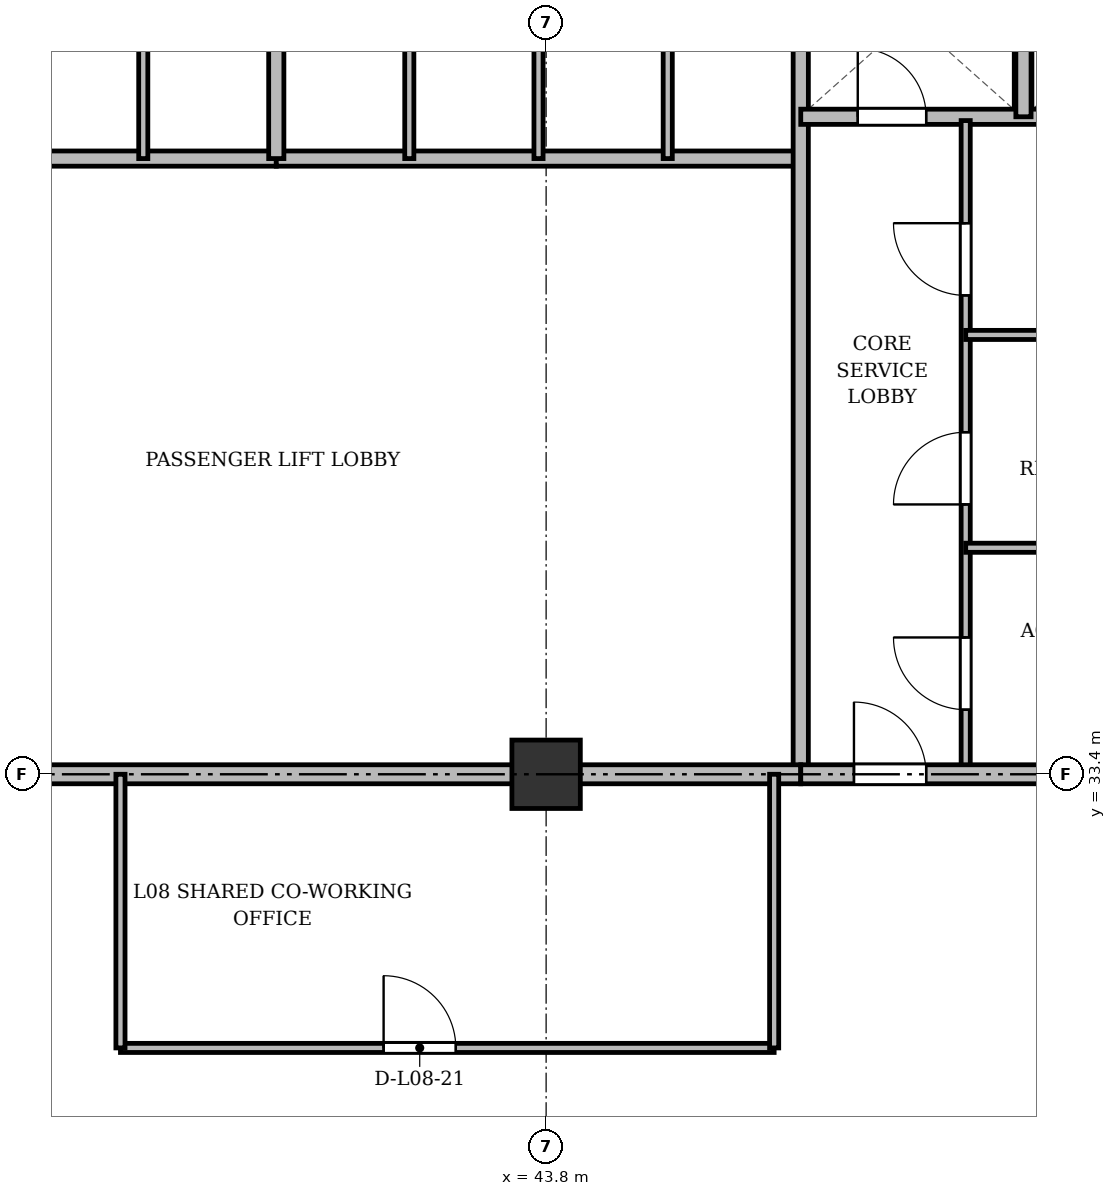
"""IFC4 building model, lengths in metres.
Left out: names, types, materials, properties, quantities, classifications, styles, units other than length and angle.
Written with IfcOpenShell. Run it as: python <this file> out.ifc"""

import sys

from ifc_helpers import new_model, si_unit, direction, frame, frame_2d, origin, origin_2d, place, context, subcontext, project, spatial, rectangle, extrude, source, transform, mapped, element, fill, save


model = new_model("IFC4")
c1 = context("Model", 3, precision=1e-05, world=origin(), true_north=direction((0.0, 1.0)))
c2 = subcontext(c1, "Body", "Model", "MODEL_VIEW")
j1 = project(units=[si_unit("LENGTHUNIT", "METRE"), si_unit("PLANEANGLEUNIT", "RADIAN")], contexts=[c1])
p1 = place(None, origin())
s1 = spatial("IfcSite", under=j1, at=p1, CompositionType="ELEMENT")
p2 = place(p1, origin())
s2 = spatial("IfcBuilding", under=s1, at=p2, CompositionType="ELEMENT")
p3 = place(p2, frame((0.0, 0.0, 34.3)))
s3 = spatial("IfcBuildingStorey", under=s2, at=p3, CompositionType="ELEMENT", Elevation=34.3)
m1 = source(origin(), c2, "Body", "SweptSolid", [
    extrude(rectangle(XDim=0.9, YDim=0.9, at=origin_2d()), origin(), (0.0, 0.0, 1.0), 3.6),
])
p4 = place(p3, frame((43.8, 33.4, 0.0), z_axis=(0.0, 0.0, 1.0), x_axis=(1.0, 0.0, 0.0)))
e1 = element("IfcColumn", 1, at=p4, inside=s3, PredefinedType="COLUMN", context=c2, shape_type="MappedRepresentation", body=[
    mapped(m1, transform((0.0, 0.0, 0.0), x_axis=(1.0, 0.0, 0.0), y_axis=(0.0, 1.0, 0.0), z_axis=(0.0, 0.0, 1.0), scale=1.0)),
])
p5 = place(p3, frame((33.35, 41.5, 0.0), z_axis=(0.0, 0.0, 1.0), x_axis=(1.0, 0.0, 0.0)))
e2 = element("IfcWall", 2, at=p5, inside=s3, PredefinedType="SOLIDWALL", context=c2, shape_type="SweptSolid", body=[
    extrude(rectangle(XDim=6.9, YDim=0.2, at=frame_2d((3.45, 0.0))), origin(), (0.0, 0.0, 1.0), 3.34),
])
p6 = place(p3, frame((38.5, 41.5, 0.0), z_axis=(0.0, 0.0, 1.0), x_axis=(0.0, 1.0, 0.0)))
e3 = element("IfcWall", 3, at=p6, inside=s3, PredefinedType="PARTITIONING", context=c2, shape_type="SweptSolid", body=[
    extrude(rectangle(XDim=3.2, YDim=0.12, at=frame_2d((1.6, 0.0))), origin(), (0.0, 0.0, 1.0), 3.34),
])
p7 = place(p3, frame((40.25, 41.5, 0.0), z_axis=(0.0, 0.0, 1.0), x_axis=(1.0, 0.0, 0.0)))
e4 = element("IfcWall", 4, at=p7, inside=s3, PredefinedType="SOLIDWALL", context=c2, shape_type="SweptSolid", body=[
    extrude(rectangle(XDim=6.9, YDim=0.2, at=frame_2d((3.45, 0.0))), origin(), (0.0, 0.0, 1.0), 2.752),
])
p8 = place(p3, frame((40.25, 41.5, 0.0), z_axis=(0.0, 0.0, 1.0), x_axis=(0.0, 1.0, 0.0)))
e5 = element("IfcWall", 5, at=p8, inside=s3, PredefinedType="SOLIDWALL", context=c2, shape_type="SweptSolid", body=[
    extrude(rectangle(XDim=3.2, YDim=0.2, at=frame_2d((1.6, 0.0))), origin(), (0.0, 0.0, 1.0), 3.34),
])
p9 = place(p3, frame((42.0, 41.5, 0.0), z_axis=(0.0, 0.0, 1.0), x_axis=(0.0, 1.0, 0.0)))
e6 = element("IfcWall", 6, at=p9, inside=s3, PredefinedType="PARTITIONING", context=c2, shape_type="SweptSolid", body=[
    extrude(rectangle(XDim=3.2, YDim=0.12, at=frame_2d((1.6, 0.0))), origin(), (0.0, 0.0, 1.0), 3.34),
])
p10 = place(p3, frame((43.7, 41.5, 0.0), z_axis=(0.0, 0.0, 1.0), x_axis=(0.0, 1.0, 0.0)))
e7 = element("IfcWall", 7, at=p10, inside=s3, PredefinedType="PARTITIONING", context=c2, shape_type="SweptSolid", body=[
    extrude(rectangle(XDim=3.2, YDim=0.12, at=frame_2d((1.6, 0.0))), origin(), (0.0, 0.0, 1.0), 2.752),
])
p11 = place(p3, frame((45.4, 41.5, 0.0), z_axis=(0.0, 0.0, 1.0), x_axis=(0.0, 1.0, 0.0)))
e8 = element("IfcWall", 8, at=p11, inside=s3, PredefinedType="PARTITIONING", context=c2, shape_type="SweptSolid", body=[
    extrude(rectangle(XDim=3.2, YDim=0.12, at=frame_2d((1.6, 0.0))), origin(), (0.0, 0.0, 1.0), 3.34),
])
p12 = place(p3, frame((47.15, 33.4, 0.0), z_axis=(0.0, 0.0, 1.0), x_axis=(0.0, 1.0, 0.0)))
e9 = element("IfcWall", 9, at=p12, inside=s3, PredefinedType="SOLIDWALL", context=c2, shape_type="SweptSolid", body=[
    extrude(rectangle(XDim=11.3, YDim=0.2, at=frame_2d((5.65, 0.0))), origin(), (0.0, 0.0, 1.0), 2.69),
])
p13 = place(p3, frame((26.3, 33.4, 0.0), z_axis=(0.0, 0.0, 1.0), x_axis=(1.0, 0.0, 0.0)))
e10 = element("IfcWall", 10, at=p13, inside=s3, PredefinedType="PARTITIONING", context=c2, shape_type="SweptSolid", body=[
    extrude(rectangle(XDim=20.85, YDim=0.25, at=frame_2d((10.425, 0.0))), origin(), (0.0, 0.0, 1.0), 2.69),
])
p14 = place(p13, frame((9.2, 0.0, 0.0)))
e11 = element("IfcOpeningElement", 11, at=p14, cuts=e10, PredefinedType="OPENING", context=c2, shape_type="SweptSolid", body=[
    extrude(rectangle(XDim=1.6, YDim=2.2, at=frame_2d((0.8, 1.1))), frame((0.0, 0.135, 0.0), z_axis=(0.0, -1.0, 0.0), x_axis=(1.0, 0.0, 0.0)), (0.0, 0.0, 1.0), 0.27),
])
p15 = place(p3, frame((47.15, 42.05, 0.0), z_axis=(0.0, 0.0, 1.0), x_axis=(1.0, 0.0, 0.0)))
e12 = element("IfcWall", 12, at=p15, inside=s3, PredefinedType="SOLIDWALL", context=c2, shape_type="SweptSolid", body=[
    extrude(rectangle(XDim=7.85, YDim=0.2, at=frame_2d((3.925, 0.0))), origin(), (0.0, 0.0, 1.0), 2.752),
])
p16 = place(p15, frame((0.75, 0.0, 0.0)))
e13 = element("IfcOpeningElement", 13, at=p16, cuts=e12, PredefinedType="OPENING", context=c2, shape_type="SweptSolid", body=[
    extrude(rectangle(XDim=0.9, YDim=2.1, at=frame_2d((0.45, 1.05))), frame((0.0, 0.11, 0.0), z_axis=(0.0, -1.0, 0.0), x_axis=(1.0, 0.0, 0.0)), (0.0, 0.0, 1.0), 0.22),
])
p17 = place(p15, frame((3.85, 0.0, 0.0)))
e14 = element("IfcOpeningElement", 14, at=p17, cuts=e12, PredefinedType="OPENING", context=c2, shape_type="SweptSolid", body=[
    extrude(rectangle(XDim=0.9, YDim=2.1, at=frame_2d((0.45, 1.05))), frame((0.0, 0.11, 0.0), z_axis=(0.0, -1.0, 0.0), x_axis=(1.0, 0.0, 0.0)), (0.0, 0.0, 1.0), 0.22),
])
p18 = place(p3, frame((50.08, 42.05, 0.0), z_axis=(0.0, 0.0, 1.0), x_axis=(0.0, 1.0, 0.0)))
e15 = element("IfcWall", 15, at=p18, inside=s3, PredefinedType="SOLIDWALL", context=c2, shape_type="SweptSolid", body=[
    extrude(rectangle(XDim=2.65, YDim=0.2, at=frame_2d((1.325, 0.0))), origin(), (0.0, 0.0, 1.0), 3.34),
])
p19 = place(p3, frame((49.32, 33.4, 0.0), z_axis=(0.0, 0.0, 1.0), x_axis=(0.0, 1.0, 0.0)))
e16 = element("IfcWall", 16, at=p19, inside=s3, PredefinedType="PARTITIONING", context=c2, shape_type="SweptSolid", body=[
    extrude(rectangle(XDim=8.6, YDim=0.12, at=frame_2d((4.3, 0.0))), origin(), (0.0, 0.0, 1.0), 2.69),
])
p20 = place(p19, frame((0.85, 0.0, 0.0)))
e17 = element("IfcOpeningElement", 17, at=p20, cuts=e16, PredefinedType="OPENING", context=c2, shape_type="SweptSolid", body=[
    extrude(rectangle(XDim=0.95, YDim=2.15, at=frame_2d((0.475, 1.075))), frame((0.0, 0.07, 0.0), z_axis=(0.0, -1.0, 0.0), x_axis=(1.0, 0.0, 0.0)), (0.0, 0.0, 1.0), 0.14),
])
p21 = place(p19, frame((3.55, 0.0, 0.0)))
e18 = element("IfcOpeningElement", 18, at=p21, cuts=e16, PredefinedType="OPENING", context=c2, shape_type="SweptSolid", body=[
    extrude(rectangle(XDim=0.95, YDim=2.15, at=frame_2d((0.475, 1.075))), frame((0.0, 0.07, 0.0), z_axis=(0.0, -1.0, 0.0), x_axis=(1.0, 0.0, 0.0)), (0.0, 0.0, 1.0), 0.14),
])
p22 = place(p19, frame((6.3, 0.0, 0.0)))
e19 = element("IfcOpeningElement", 19, at=p22, cuts=e16, PredefinedType="OPENING", context=c2, shape_type="SweptSolid", body=[
    extrude(rectangle(XDim=0.95, YDim=2.15, at=frame_2d((0.475, 1.075))), frame((0.0, 0.07, 0.0), z_axis=(0.0, -1.0, 0.0), x_axis=(1.0, 0.0, 0.0)), (0.0, 0.0, 1.0), 0.14),
])
for number, where, z_axis, x_axis in (
    (20, (49.32, 36.38, 0.0), (0.0, 0.0, 1.0), (1.0, 0.0, 0.0)),
    (21, (49.32, 39.18, 0.0), (0.0, 0.0, 1.0), (1.0, 0.0, 0.0)),
):
    element("IfcWall", number, at=place(p3, frame(where, z_axis=z_axis, x_axis=x_axis)), inside=s3, PredefinedType="PARTITIONING", context=c2, shape_type="SweptSolid", body=[
        extrude(rectangle(XDim=3.13, YDim=0.12, at=frame_2d((1.565, 0.0))), origin(), (0.0, 0.0, 1.0), 2.752),
    ])
p23 = place(p3, frame((47.15, 33.4, 0.0), z_axis=(0.0, 0.0, 1.0), x_axis=(1.0, 0.0, 0.0)))
e22 = element("IfcWall", 22, at=p23, inside=s3, PredefinedType="PARTITIONING", context=c2, shape_type="SweptSolid", body=[
    extrude(rectangle(XDim=11.15, YDim=0.25, at=frame_2d((5.575, 0.0))), origin(), (0.0, 0.0, 1.0), 2.69),
])
p24 = place(p23, frame((0.7, 0.0, 0.0)))
e23 = element("IfcOpeningElement", 23, at=p24, cuts=e22, PredefinedType="OPENING", context=c2, shape_type="SweptSolid", body=[
    extrude(rectangle(XDim=0.95, YDim=2.15, at=frame_2d((0.475, 1.075))), frame((0.0, 0.135, 0.0), z_axis=(0.0, -1.0, 0.0), x_axis=(1.0, 0.0, 0.0)), (0.0, 0.0, 1.0), 0.27),
])
p25 = place(p23, frame((6.0, 0.0, 0.0)))
e24 = element("IfcOpeningElement", 24, at=p25, cuts=e22, PredefinedType="OPENING", context=c2, shape_type="SweptSolid", body=[
    extrude(rectangle(XDim=1.2, YDim=2.15, at=frame_2d((0.6, 1.075))), frame((0.0, 0.135, 0.0), z_axis=(0.0, -1.0, 0.0), x_axis=(1.0, 0.0, 0.0)), (0.0, 0.0, 1.0), 0.27),
])
p26 = place(p3, frame((38.2, 29.8, 0.0), z_axis=(0.0, 0.0, 1.0), x_axis=(1.0, 0.0, 0.0)))
e25 = element("IfcWall", 25, at=p26, inside=s3, PredefinedType="PARTITIONING", context=c2, shape_type="SweptSolid", body=[
    extrude(rectangle(XDim=8.6, YDim=0.12, at=frame_2d((4.3, 0.0))), origin(), (0.0, 0.0, 1.0), 2.752),
])
p27 = place(p26, frame((3.462, 0.0, 0.0)))
e26 = element("IfcOpeningElement", 26, at=p27, cuts=e25, PredefinedType="OPENING", context=c2, shape_type="SweptSolid", body=[
    extrude(rectangle(XDim=0.95, YDim=2.15, at=frame_2d((0.475, 1.075))), frame((0.0, 0.07, 0.0), z_axis=(0.0, -1.0, 0.0), x_axis=(1.0, 0.0, 0.0)), (0.0, 0.0, 1.0), 0.14),
])
for number, where, z_axis, x_axis in (
    (27, (38.2, 29.8, 0.0), (0.0, 0.0, 1.0), (0.0, 1.0, 0.0)),
    (28, (46.8, 29.8, 0.0), (0.0, 0.0, 1.0), (0.0, 1.0, 0.0)),
):
    element("IfcWall", number, at=place(p3, frame(where, z_axis=z_axis, x_axis=x_axis)), inside=s3, PredefinedType="PARTITIONING", context=c2, shape_type="SweptSolid", body=[
        extrude(rectangle(XDim=3.6, YDim=0.12, at=frame_2d((1.8, 0.0))), origin(), (0.0, 0.0, 1.0), 2.69),
    ])
m2 = source(origin(), c2, "Body", "SweptSolid", [
    extrude(rectangle(XDim=0.9, YDim=2.1, at=frame_2d((0.45, 1.05))), frame((0.0, 0.025, 0.0), z_axis=(0.0, -1.0, 0.0), x_axis=(1.0, 0.0, 0.0)), (0.0, 0.0, 1.0), 0.05),
])
p28 = place(p16, origin())
e29 = element("IfcDoor", 29, at=p28, inside=s3, OperationType="SINGLE_SWING_LEFT", PredefinedType="DOOR", context=c2, shape_type="MappedRepresentation", body=[
    mapped(m2, transform((0.0, 0.0, 0.0), x_axis=(1.0, 0.0, 0.0), y_axis=(0.0, 1.0, 0.0), z_axis=(0.0, 0.0, 1.0), scale=1.0)),
])
fill(e13, e29)
m3 = source(origin(), c2, "Body", "SweptSolid", [
    extrude(rectangle(XDim=0.95, YDim=2.15, at=frame_2d((0.475, 1.075))), frame((0.0, 0.025, 0.0), z_axis=(0.0, -1.0, 0.0), x_axis=(1.0, 0.0, 0.0)), (0.0, 0.0, 1.0), 0.05),
])
p29 = place(p20, origin())
e30 = element("IfcDoor", 30, at=p29, inside=s3, OperationType="SINGLE_SWING_RIGHT", PredefinedType="DOOR", context=c2, shape_type="MappedRepresentation", body=[
    mapped(m3, transform((0.0, 0.0, 0.0), x_axis=(1.0, 0.0, 0.0), y_axis=(0.0, 1.0, 0.0), z_axis=(0.0, 0.0, 1.0), scale=1.0)),
])
fill(e17, e30)
p30 = place(p21, origin())
e31 = element("IfcDoor", 31, at=p30, inside=s3, OperationType="SINGLE_SWING_LEFT", PredefinedType="DOOR", context=c2, shape_type="MappedRepresentation", body=[
    mapped(m3, transform((0.0, 0.0, 0.0), x_axis=(1.0, 0.0, 0.0), y_axis=(0.0, 1.0, 0.0), z_axis=(0.0, 0.0, 1.0), scale=1.0)),
])
fill(e18, e31)
p31 = place(p22, origin())
e32 = element("IfcDoor", 32, at=p31, inside=s3, OperationType="SINGLE_SWING_RIGHT", PredefinedType="DOOR", context=c2, shape_type="MappedRepresentation", body=[
    mapped(m3, transform((0.0, 0.0, 0.0), x_axis=(1.0, 0.0, 0.0), y_axis=(0.0, 1.0, 0.0), z_axis=(0.0, 0.0, 1.0), scale=1.0)),
])
fill(e19, e32)
p32 = place(p24, origin())
e33 = element("IfcDoor", 33, at=p32, inside=s3, OperationType="SINGLE_SWING_LEFT", PredefinedType="DOOR", context=c2, shape_type="MappedRepresentation", body=[
    mapped(m3, transform((0.0, 0.0, 0.0), x_axis=(1.0, 0.0, 0.0), y_axis=(0.0, 1.0, 0.0), z_axis=(0.0, 0.0, 1.0), scale=1.0)),
])
fill(e23, e33)
p33 = place(p27, origin())
e34 = element("IfcDoor", 34, at=p33, inside=s3, OperationType="SINGLE_SWING_LEFT", PredefinedType="DOOR", context=c2, shape_type="MappedRepresentation", body=[
    mapped(m3, transform((0.0, 0.0, 0.0), x_axis=(1.0, 0.0, 0.0), y_axis=(0.0, 1.0, 0.0), z_axis=(0.0, 0.0, 1.0), scale=1.0)),
])
fill(e26, e34)
save(model, sys.argv[1])
